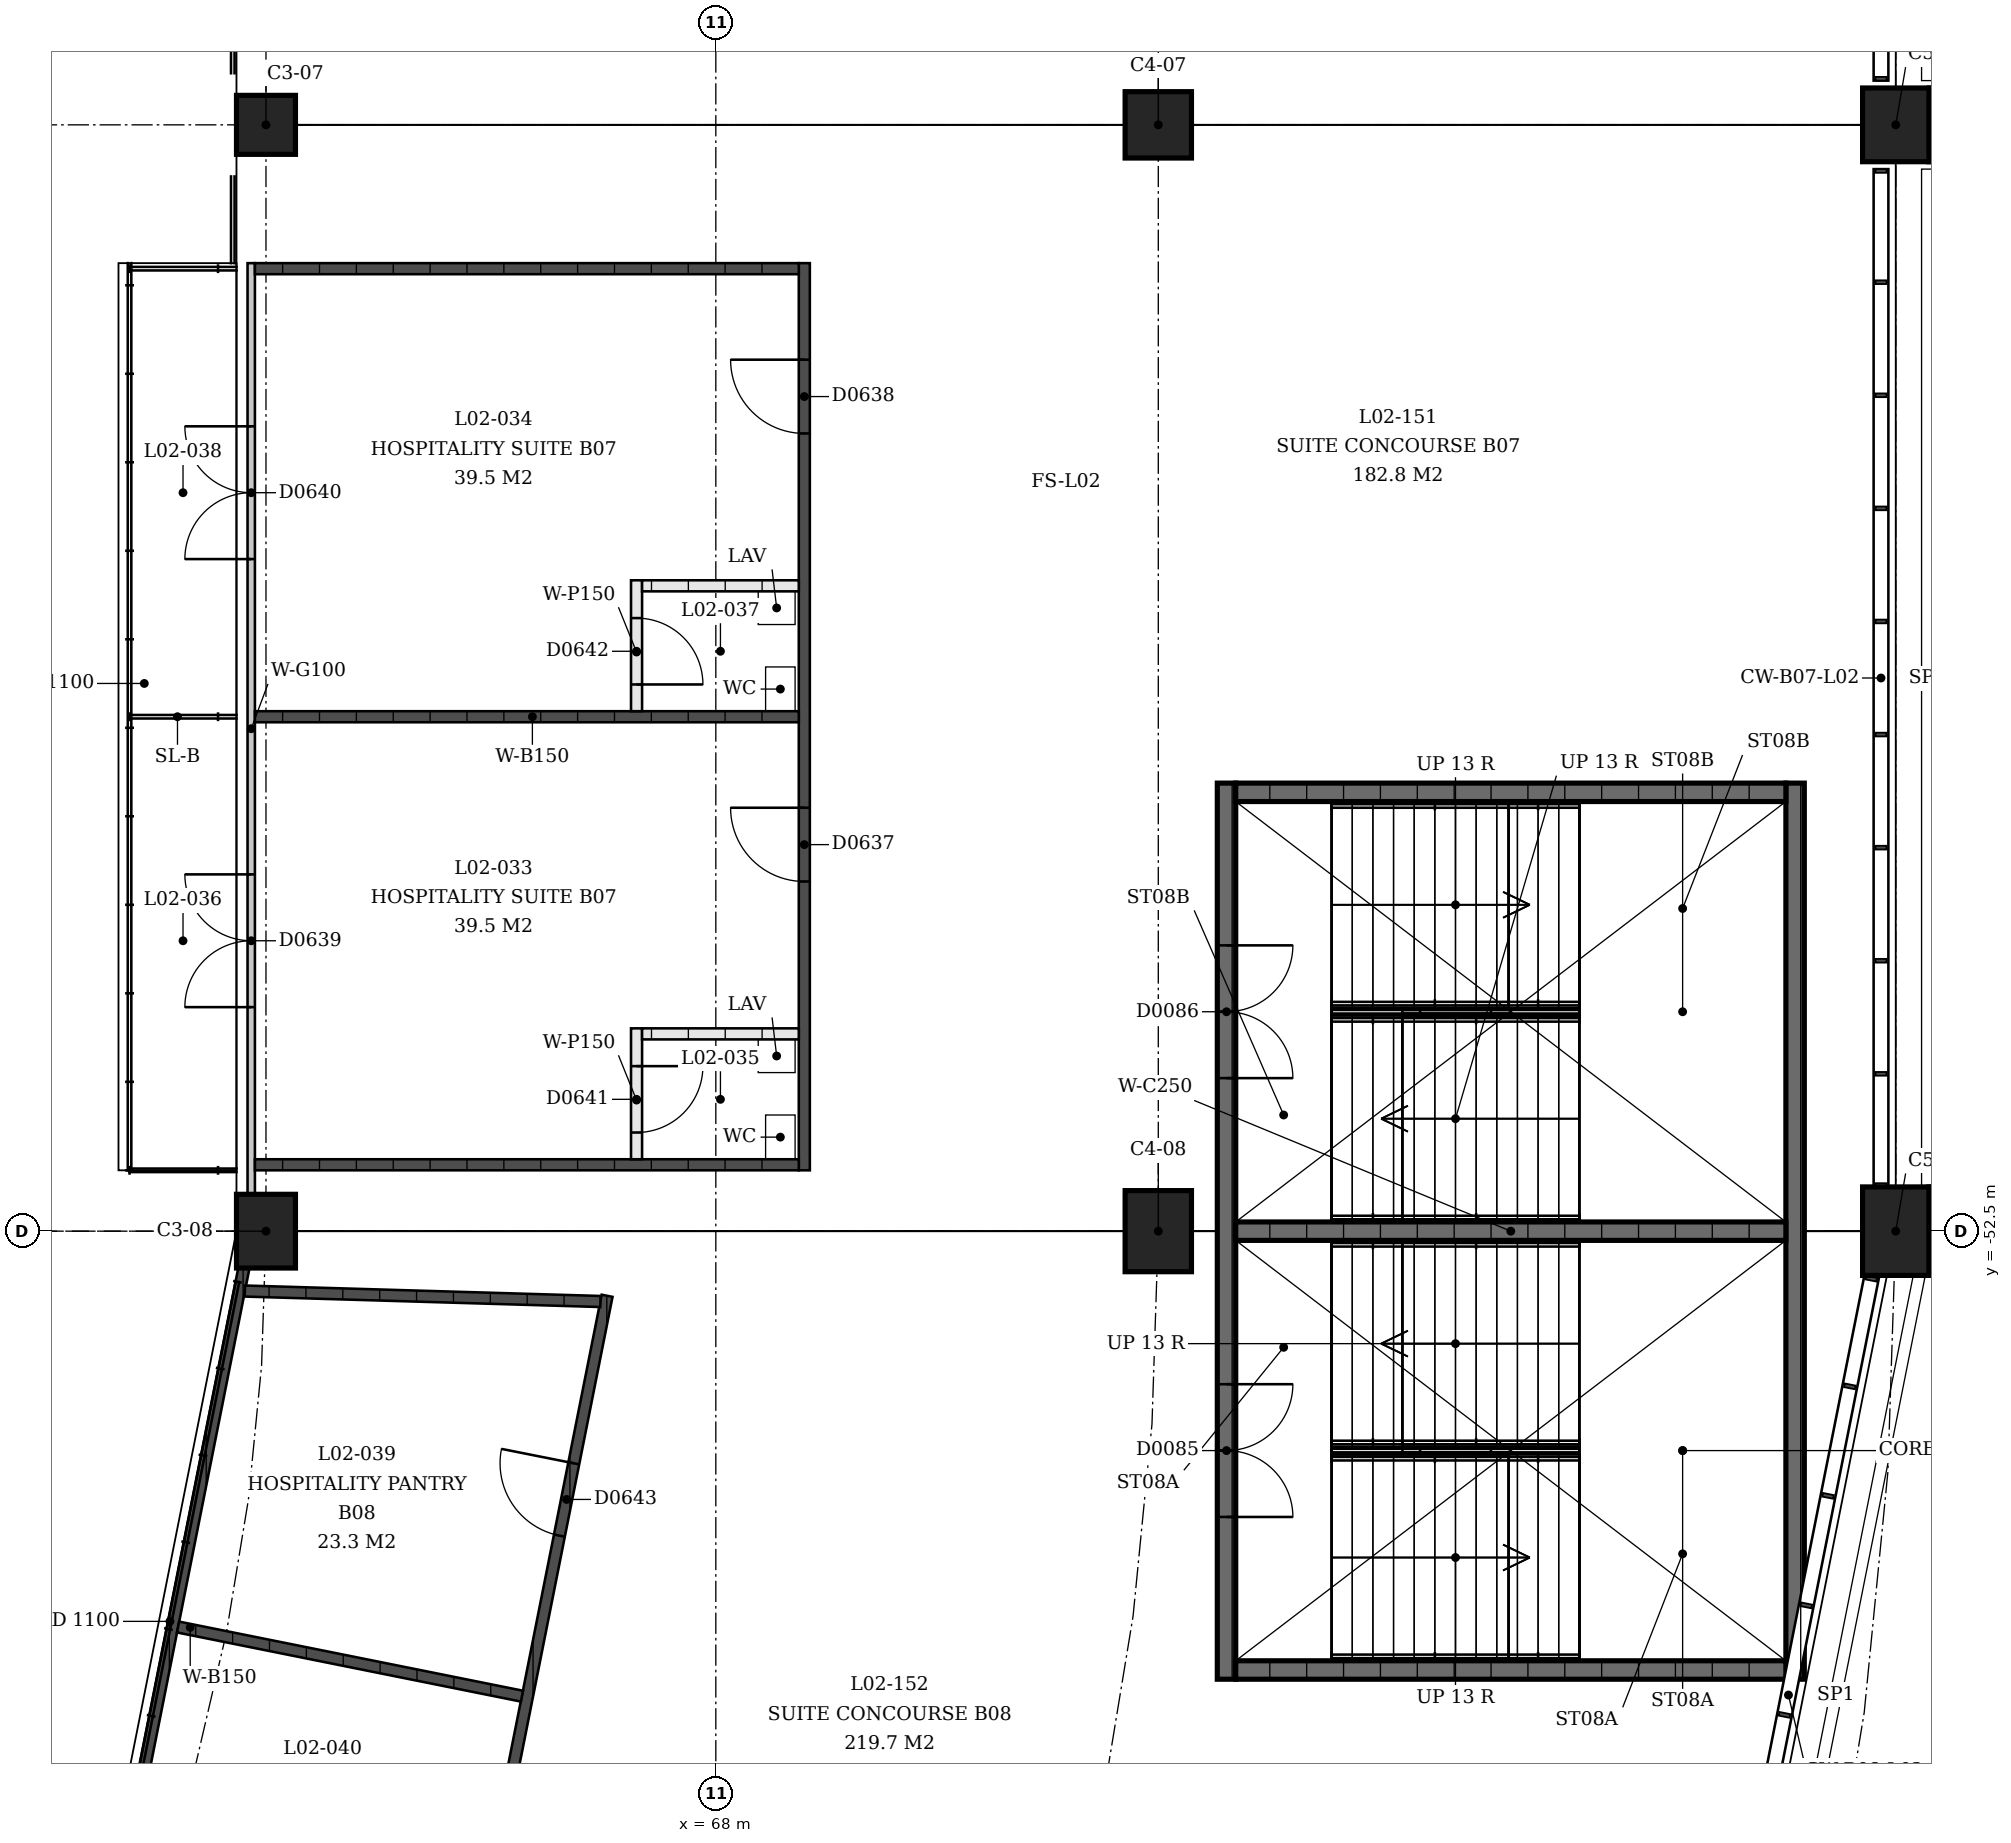
"""IFC4 building model, lengths in metres.
Left out: names, types, materials, properties, quantities, classifications, styles, units other than length and angle.
Written with IfcOpenShell. Run it as: python <this file> out.ifc"""

import sys

from ifc_helpers import new_model, si_unit, direction, frame, frame_2d, origin, origin_2d, place, context, subcontext, project, spatial, rectangle, extrude, element, fill, save


model = new_model("IFC4")
c1 = context("Model", 3, precision=1e-05, world=origin(), true_north=direction((0.0, 1.0)))
c2 = subcontext(c1, "Body", "Model", "MODEL_VIEW")
j1 = project(units=[si_unit("LENGTHUNIT", "METRE"), si_unit("PLANEANGLEUNIT", "RADIAN")], contexts=[c1])
p1 = place(None, origin())
s1 = spatial("IfcSite", under=j1, at=p1, CompositionType="ELEMENT")
p2 = place(p1, origin())
s2 = spatial("IfcBuilding", under=s1, at=p2, CompositionType="ELEMENT")
p3 = place(p2, frame((0.0, 0.0, 9.0)))
s3 = spatial("IfcBuildingStorey", under=s2, at=p3, CompositionType="ELEMENT", Elevation=9.0)
p4 = place(p3, frame((61.9, -37.5, 0.0), z_axis=(0.0, 0.0, 1.0), x_axis=(0.0, 1.0, 0.0)))
e1 = element("IfcColumn", 1, at=p4, inside=s3, PredefinedType="COLUMN", context=c2, shape_type="SweptSolid", body=[
    extrude(rectangle(XDim=0.8, YDim=0.8, at=origin_2d()), origin(), (0.0, 0.0, 1.0), 4.5),
])
p5 = place(p3, frame((74.0, -37.5, 0.0), z_axis=(0.0, 0.0, 1.0), x_axis=(0.0, 1.0, 0.0)))
e2 = element("IfcColumn", 2, at=p5, inside=s3, PredefinedType="COLUMN", context=c2, shape_type="SweptSolid", body=[
    extrude(rectangle(XDim=0.9, YDim=0.9, at=origin_2d()), origin(), (0.0, 0.0, 1.0), 4.5),
])
p6 = place(p3, frame((84.0, -37.5, 0.0), z_axis=(0.0, 0.0, 1.0), x_axis=(0.0, 1.0, 0.0)))
e3 = element("IfcColumn", 3, at=p6, inside=s3, PredefinedType="COLUMN", context=c2, shape_type="SweptSolid", body=[
    extrude(rectangle(XDim=1.0, YDim=0.9, at=origin_2d()), origin(), (0.0, 0.0, 1.0), 4.5),
])
p7 = place(p3, frame((61.9, -52.5, 0.0), z_axis=(0.0, 0.0, 1.0), x_axis=(0.0, 1.0, 0.0)))
e4 = element("IfcColumn", 4, at=p7, inside=s3, PredefinedType="COLUMN", context=c2, shape_type="SweptSolid", body=[
    extrude(rectangle(XDim=1.0, YDim=0.8, at=origin_2d()), origin(), (0.0, 0.0, 1.0), 4.5),
])
p8 = place(p3, frame((74.0, -52.5, 0.0), z_axis=(0.0, 0.0, 1.0), x_axis=(0.0, 1.0, 0.0)))
e5 = element("IfcColumn", 5, at=p8, inside=s3, PredefinedType="COLUMN", context=c2, shape_type="SweptSolid", body=[
    extrude(rectangle(XDim=1.1, YDim=0.9, at=origin_2d()), origin(), (0.0, 0.0, 1.0), 4.5),
])
p9 = place(p3, frame((84.0, -52.5, 0.0), z_axis=(0.0, 0.0, 1.0), x_axis=(0.0, 1.0, 0.0)))
e6 = element("IfcColumn", 6, at=p9, inside=s3, PredefinedType="COLUMN", context=c2, shape_type="SweptSolid", body=[
    extrude(rectangle(XDim=1.2, YDim=0.9, at=origin_2d()), origin(), (0.0, 0.0, 1.0), 4.5),
])
p10 = place(p3, frame((74.925, -58.575, 0.0), z_axis=(0.0, 0.0, 1.0), x_axis=(0.0, 1.0, 0.0)))
e7 = element("IfcWall", 7, at=p10, inside=s3, PredefinedType="SHEAR", context=c2, shape_type="SweptSolid", body=[
    extrude(rectangle(XDim=12.15, YDim=0.25, at=frame_2d((6.075, 0.0))), origin(), (0.0, 0.0, 1.0), 4.09),
])
p11 = place(p10, frame((2.2, 0.0, 0.0)))
e8 = element("IfcOpeningElement", 8, at=p11, cuts=e7, PredefinedType="OPENING", context=c2, shape_type="SweptSolid", body=[
    extrude(rectangle(XDim=1.8, YDim=2.1, at=frame_2d((0.9, 1.05))), frame((0.0, 0.125, 0.0), z_axis=(0.0, -1.0, 0.0), x_axis=(1.0, 0.0, 0.0)), (0.0, 0.0, 1.0), 0.25),
])
p12 = place(p10, frame((8.15, 0.0, 0.0)))
e9 = element("IfcOpeningElement", 9, at=p12, cuts=e7, PredefinedType="OPENING", context=c2, shape_type="SweptSolid", body=[
    extrude(rectangle(XDim=1.8, YDim=2.1, at=frame_2d((0.9, 1.05))), frame((0.0, 0.125, 0.0), z_axis=(0.0, -1.0, 0.0), x_axis=(1.0, 0.0, 0.0)), (0.0, 0.0, 1.0), 0.25),
])
p13 = place(p3, frame((82.635, -58.575, 0.0), z_axis=(0.0, 0.0, 1.0), x_axis=(0.0, 1.0, 0.0)))
e10 = element("IfcWall", 10, at=p13, inside=s3, PredefinedType="SHEAR", context=c2, shape_type="SweptSolid", body=[
    extrude(rectangle(XDim=12.15, YDim=0.25, at=frame_2d((6.075, 0.0))), origin(), (0.0, 0.0, 1.0), 4.09),
])
for number, where, z_axis, x_axis in (
    (11, (75.05, -58.45, 0.0), (0.0, 0.0, 1.0), (1.0, 0.0, 0.0)),
    (12, (75.05, -46.55, 0.0), (0.0, 0.0, 1.0), (1.0, 0.0, 0.0)),
    (13, (75.05, -52.5, 0.0), (0.0, 0.0, 1.0), (1.0, 0.0, 0.0)),
):
    element("IfcWall", number, at=place(p3, frame(where, z_axis=z_axis, x_axis=x_axis)), inside=s3, PredefinedType="SHEAR", context=c2, shape_type="SweptSolid", body=[
        extrude(rectangle(XDim=7.46, YDim=0.25, at=frame_2d((3.73, 0.0))), origin(), (0.0, 0.0, 1.0), 4.09),
    ])
p14 = place(p3, frame((61.7, -52.0, 0.0), z_axis=(0.0, 0.0, 1.0), x_axis=(0.0, 1.0, 0.0)))
e14 = element("IfcWall", 14, at=p14, inside=s3, PredefinedType="PARTITIONING", context=c2, shape_type="SweptSolid", body=[
    extrude(rectangle(XDim=12.625, YDim=0.1, at=frame_2d((6.312, 0.0))), origin(), (0.0, 0.0, 1.0), 3.0),
])
p15 = place(p14, frame((2.538, 0.0, 0.0)))
e15 = element("IfcOpeningElement", 15, at=p15, cuts=e14, PredefinedType="OPENING", context=c2, shape_type="SweptSolid", body=[
    extrude(rectangle(XDim=1.8, YDim=2.1, at=frame_2d((0.9, 1.05))), frame((0.0, 0.05, 0.0), z_axis=(0.0, -1.0, 0.0), x_axis=(1.0, 0.0, 0.0)), (0.0, 0.0, 1.0), 0.1),
])
p16 = place(p14, frame((8.613, 0.0, 0.0)))
e16 = element("IfcOpeningElement", 16, at=p16, cuts=e14, PredefinedType="OPENING", context=c2, shape_type="SweptSolid", body=[
    extrude(rectangle(XDim=1.8, YDim=2.1, at=frame_2d((0.9, 1.05))), frame((0.0, 0.05, 0.0), z_axis=(0.0, -1.0, 0.0), x_axis=(1.0, 0.0, 0.0)), (0.0, 0.0, 1.0), 0.1),
])
p17 = place(p3, frame((69.2, -51.675, 0.0), z_axis=(0.0, 0.0, 1.0), x_axis=(0.0, 1.0, 0.0)))
e17 = element("IfcWall", 17, at=p17, inside=s3, PredefinedType="SOLIDWALL", context=c2, shape_type="SweptSolid", body=[
    extrude(rectangle(XDim=12.3, YDim=0.15, at=frame_2d((6.15, 0.0))), origin(), (0.0, 0.0, 1.0), 3.0),
])
p18 = place(p17, frame((3.916, 0.0, 0.0)))
e18 = element("IfcOpeningElement", 18, at=p18, cuts=e17, PredefinedType="OPENING", context=c2, shape_type="SweptSolid", body=[
    extrude(rectangle(XDim=1.0, YDim=2.1, at=frame_2d((0.5, 1.05))), frame((0.0, 0.075, 0.0), z_axis=(0.0, -1.0, 0.0), x_axis=(1.0, 0.0, 0.0)), (0.0, 0.0, 1.0), 0.15),
])
p19 = place(p17, frame((9.991, 0.0, 0.0)))
e19 = element("IfcOpeningElement", 19, at=p19, cuts=e17, PredefinedType="OPENING", context=c2, shape_type="SweptSolid", body=[
    extrude(rectangle(XDim=1.0, YDim=2.1, at=frame_2d((0.5, 1.05))), frame((0.0, 0.075, 0.0), z_axis=(0.0, -1.0, 0.0), x_axis=(1.0, 0.0, 0.0)), (0.0, 0.0, 1.0), 0.15),
])
for number, where, z_axis, x_axis in (
    (20, (61.75, -51.6, 0.0), (0.0, 0.0, 1.0), (1.0, 0.0, 0.0)),
    (21, (61.75, -45.525, 0.0), (0.0, 0.0, 1.0), (1.0, 0.0, 0.0)),
    (22, (61.75, -39.45, 0.0), (0.0, 0.0, 1.0), (1.0, 0.0, 0.0)),
):
    element("IfcWall", number, at=place(p3, frame(where, z_axis=z_axis, x_axis=x_axis)), inside=s3, PredefinedType="SOLIDWALL", context=c2, shape_type="SweptSolid", body=[
        extrude(rectangle(XDim=7.375, YDim=0.15, at=frame_2d((3.688, 0.0))), origin(), (0.0, 0.0, 1.0), 3.0),
    ])
p20 = place(p3, frame((66.925, -51.525, 0.0), z_axis=(0.0, 0.0, 1.0), x_axis=(0.0, 1.0, 0.0)))
e23 = element("IfcWall", 23, at=p20, inside=s3, PredefinedType="PARTITIONING", context=c2, shape_type="SweptSolid", body=[
    extrude(rectangle(XDim=1.775, YDim=0.15, at=frame_2d((0.887, 0.0))), origin(), (0.0, 0.0, 1.0), 3.0),
])
p21 = place(p20, frame((0.363, 0.0, 0.0)))
e24 = element("IfcOpeningElement", 24, at=p21, cuts=e23, PredefinedType="OPENING", context=c2, shape_type="SweptSolid", body=[
    extrude(rectangle(XDim=0.9, YDim=2.1, at=frame_2d((0.45, 1.05))), frame((0.0, 0.075, 0.0), z_axis=(0.0, -1.0, 0.0), x_axis=(1.0, 0.0, 0.0)), (0.0, 0.0, 1.0), 0.15),
])
p22 = place(p3, frame((67.0, -49.825, 0.0), z_axis=(0.0, 0.0, 1.0), x_axis=(1.0, 0.0, 0.0)))
e25 = element("IfcWall", 25, at=p22, inside=s3, PredefinedType="PARTITIONING", context=c2, shape_type="SweptSolid", body=[
    extrude(rectangle(XDim=2.125, YDim=0.15, at=frame_2d((1.062, 0.0))), origin(), (0.0, 0.0, 1.0), 3.0),
])
p23 = place(p3, frame((66.925, -45.45, 0.0), z_axis=(0.0, 0.0, 1.0), x_axis=(0.0, 1.0, 0.0)))
e26 = element("IfcWall", 26, at=p23, inside=s3, PredefinedType="PARTITIONING", context=c2, shape_type="SweptSolid", body=[
    extrude(rectangle(XDim=1.775, YDim=0.15, at=frame_2d((0.887, 0.0))), origin(), (0.0, 0.0, 1.0), 3.0),
])
p24 = place(p23, frame((0.363, 0.0, 0.0)))
e27 = element("IfcOpeningElement", 27, at=p24, cuts=e26, PredefinedType="OPENING", context=c2, shape_type="SweptSolid", body=[
    extrude(rectangle(XDim=0.9, YDim=2.1, at=frame_2d((0.45, 1.05))), frame((0.0, 0.075, 0.0), z_axis=(0.0, -1.0, 0.0), x_axis=(1.0, 0.0, 0.0)), (0.0, 0.0, 1.0), 0.15),
])
p25 = place(p3, frame((67.0, -43.75, 0.0), z_axis=(0.0, 0.0, 1.0), x_axis=(1.0, 0.0, 0.0)))
e28 = element("IfcWall", 28, at=p25, inside=s3, PredefinedType="PARTITIONING", context=c2, shape_type="SweptSolid", body=[
    extrude(rectangle(XDim=2.125, YDim=0.15, at=frame_2d((1.062, 0.0))), origin(), (0.0, 0.0, 1.0), 3.0),
])
p26 = place(p3, frame((61.601, -53.0, 0.0), z_axis=(0.0, 0.0, 1.0), x_axis=(-0.195099676887, -0.980783419557, 0.0)))
e29 = element("IfcWall", 29, at=p26, inside=s3, PredefinedType="SOLIDWALL", context=c2, shape_type="SweptSolid", body=[
    extrude(rectangle(XDim=9.839, YDim=0.15, at=frame_2d((4.92, 0.0))), origin(), (0.0, 0.0, 1.0), 3.0),
])
p27 = place(p3, frame((66.526, -53.376, 0.0), z_axis=(0.0, 0.0, 1.0), x_axis=(-0.195088107962, -0.980785720803, 0.0)))
e30 = element("IfcWall", 30, at=p27, inside=s3, PredefinedType="SOLIDWALL", context=c2, shape_type="SweptSolid", body=[
    extrude(rectangle(XDim=11.099, YDim=0.15, at=frame_2d((5.55, 0.0))), origin(), (0.0, 0.0, 1.0), 3.0),
])
p28 = place(p27, frame((2.315, 0.0, 0.0)))
e31 = element("IfcOpeningElement", 31, at=p28, cuts=e30, PredefinedType="OPENING", context=c2, shape_type="SweptSolid", body=[
    extrude(rectangle(XDim=1.0, YDim=2.1, at=frame_2d((0.5, 1.05))), frame((0.0, 0.075, 0.0), z_axis=(0.0, -1.0, 0.0), x_axis=(1.0, 0.0, 0.0)), (0.0, 0.0, 1.0), 0.15),
])
p29 = place(p27, frame((7.784, 0.0, 0.0)))
e32 = element("IfcOpeningElement", 32, at=p29, cuts=e30, PredefinedType="OPENING", context=c2, shape_type="SweptSolid", body=[
    extrude(rectangle(XDim=1.0, YDim=2.1, at=frame_2d((0.5, 1.05))), frame((0.0, 0.075, 0.0), z_axis=(0.0, -1.0, 0.0), x_axis=(1.0, 0.0, 0.0)), (0.0, 0.0, 1.0), 0.15),
])
p30 = place(p3, frame((61.614, -53.312, 0.0), z_axis=(0.0, 0.0, 1.0), x_axis=(0.999567579473, -0.029405000692, 0.0)))
e33 = element("IfcWall", 33, at=p30, inside=s3, PredefinedType="SOLIDWALL", context=c2, shape_type="SweptSolid", body=[
    extrude(rectangle(XDim=4.824, YDim=0.15, at=frame_2d((2.412, 0.0))), origin(), (0.0, 0.0, 1.0), 3.0),
])
p31 = place(p3, frame((60.707, -57.867, 0.0), z_axis=(0.0, 0.0, 1.0), x_axis=(0.980396663012, -0.19703396447, 0.0)))
e34 = element("IfcWall", 34, at=p31, inside=s3, PredefinedType="SOLIDWALL", context=c2, shape_type="SweptSolid", body=[
    extrude(rectangle(XDim=4.757, YDim=0.15, at=frame_2d((2.378, 0.0))), origin(), (0.0, 0.0, 1.0), 3.0),
])
p32 = place(p11, origin())
e35 = element("IfcDoor", 35, at=p32, inside=s3, OperationType="DOUBLE_DOOR_SINGLE_SWING", PredefinedType="DOOR", context=c2, shape_type="SweptSolid", body=[
    extrude(rectangle(XDim=1.8, YDim=2.1, at=frame_2d((0.9, 1.05))), frame((0.0, 0.025, 0.0), z_axis=(0.0, -1.0, 0.0), x_axis=(1.0, 0.0, 0.0)), (0.0, 0.0, 1.0), 0.05),
])
fill(e8, e35)
p33 = place(p12, origin())
e36 = element("IfcDoor", 36, at=p33, inside=s3, OperationType="DOUBLE_DOOR_SINGLE_SWING", PredefinedType="DOOR", context=c2, shape_type="SweptSolid", body=[
    extrude(rectangle(XDim=1.8, YDim=2.1, at=frame_2d((0.9, 1.05))), frame((0.0, 0.025, 0.0), z_axis=(0.0, -1.0, 0.0), x_axis=(1.0, 0.0, 0.0)), (0.0, 0.0, 1.0), 0.05),
])
fill(e9, e36)
p34 = place(p18, origin())
e37 = element("IfcDoor", 37, at=p34, inside=s3, OperationType="SINGLE_SWING_LEFT", PredefinedType="DOOR", context=c2, shape_type="SweptSolid", body=[
    extrude(rectangle(XDim=1.0, YDim=2.1, at=frame_2d((0.5, 1.05))), frame((0.0, 0.025, 0.0), z_axis=(0.0, -1.0, 0.0), x_axis=(1.0, 0.0, 0.0)), (0.0, 0.0, 1.0), 0.05),
])
fill(e18, e37)
p35 = place(p19, origin())
e38 = element("IfcDoor", 38, at=p35, inside=s3, OperationType="SINGLE_SWING_LEFT", PredefinedType="DOOR", context=c2, shape_type="SweptSolid", body=[
    extrude(rectangle(XDim=1.0, YDim=2.1, at=frame_2d((0.5, 1.05))), frame((0.0, 0.025, 0.0), z_axis=(0.0, -1.0, 0.0), x_axis=(1.0, 0.0, 0.0)), (0.0, 0.0, 1.0), 0.05),
])
fill(e19, e38)
p36 = place(p15, origin())
e39 = element("IfcDoor", 39, at=p36, inside=s3, OperationType="DOUBLE_DOOR_SINGLE_SWING", PredefinedType="DOOR", context=c2, shape_type="SweptSolid", body=[
    extrude(rectangle(XDim=1.8, YDim=2.1, at=frame_2d((0.9, 1.05))), frame((0.0, 0.025, 0.0), z_axis=(0.0, -1.0, 0.0), x_axis=(1.0, 0.0, 0.0)), (0.0, 0.0, 1.0), 0.05),
])
fill(e15, e39)
p37 = place(p16, origin())
e40 = element("IfcDoor", 40, at=p37, inside=s3, OperationType="DOUBLE_DOOR_SINGLE_SWING", PredefinedType="DOOR", context=c2, shape_type="SweptSolid", body=[
    extrude(rectangle(XDim=1.8, YDim=2.1, at=frame_2d((0.9, 1.05))), frame((0.0, 0.025, 0.0), z_axis=(0.0, -1.0, 0.0), x_axis=(1.0, 0.0, 0.0)), (0.0, 0.0, 1.0), 0.05),
])
fill(e16, e40)
p38 = place(p21, origin())
e41 = element("IfcDoor", 41, at=p38, inside=s3, OperationType="SINGLE_SWING_RIGHT", PredefinedType="DOOR", context=c2, shape_type="SweptSolid", body=[
    extrude(rectangle(XDim=0.9, YDim=2.1, at=frame_2d((0.45, 1.05))), frame((0.0, 0.025, 0.0), z_axis=(0.0, -1.0, 0.0), x_axis=(1.0, 0.0, 0.0)), (0.0, 0.0, 1.0), 0.05),
])
fill(e24, e41)
p39 = place(p24, origin())
e42 = element("IfcDoor", 42, at=p39, inside=s3, OperationType="SINGLE_SWING_LEFT", PredefinedType="DOOR", context=c2, shape_type="SweptSolid", body=[
    extrude(rectangle(XDim=0.9, YDim=2.1, at=frame_2d((0.45, 1.05))), frame((0.0, 0.025, 0.0), z_axis=(0.0, -1.0, 0.0), x_axis=(1.0, 0.0, 0.0)), (0.0, 0.0, 1.0), 0.05),
])
fill(e27, e42)
p40 = place(p28, origin())
e43 = element("IfcDoor", 43, at=p40, inside=s3, OperationType="SINGLE_SWING_LEFT", PredefinedType="DOOR", context=c2, shape_type="SweptSolid", body=[
    extrude(rectangle(XDim=1.0, YDim=2.1, at=frame_2d((0.5, 1.05))), frame((0.0, 0.025, 0.0), z_axis=(0.0, -1.0, 0.0), x_axis=(1.0, 0.0, 0.0)), (0.0, 0.0, 1.0), 0.05),
])
fill(e31, e43)
save(model, sys.argv[1])
